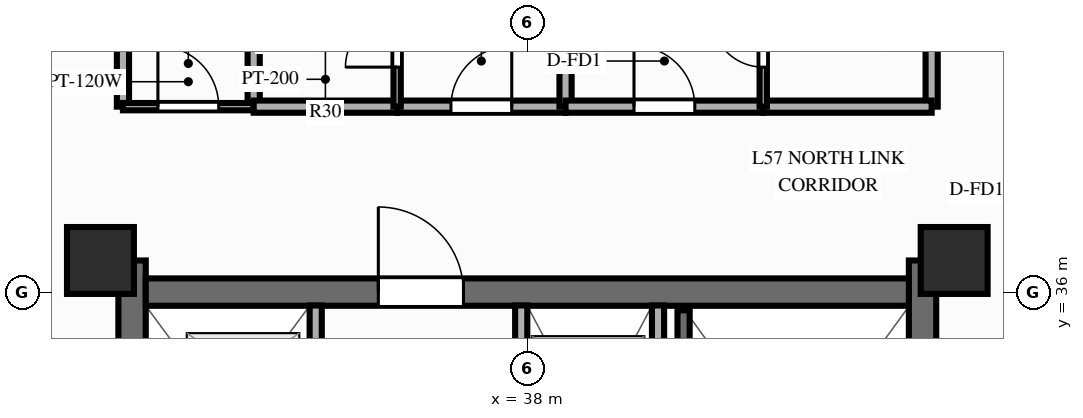
"""IFC4 building model, lengths in metres.
Left out: names, types, materials, properties, quantities, classifications, styles, units other than length and angle.
Written with IfcOpenShell. Run it as: python <this file> out.ifc"""

import sys

from ifc_helpers import new_model, si_unit, direction, frame, frame_2d, origin, origin_2d, place, context, subcontext, project, spatial, rectangle, extrude, source, transform, mapped, element, fill, save


model = new_model("IFC4")
c1 = context("Model", 3, precision=1e-05, world=origin(), true_north=direction((0.0, 1.0)))
c2 = subcontext(c1, "Body", "Model", "MODEL_VIEW")
j1 = project(units=[si_unit("LENGTHUNIT", "METRE"), si_unit("PLANEANGLEUNIT", "RADIAN")], contexts=[c1])
p1 = place(None, origin())
s1 = spatial("IfcSite", under=j1, at=p1, CompositionType="ELEMENT")
p2 = place(p1, origin())
s2 = spatial("IfcBuilding", under=s1, at=p2, CompositionType="ELEMENT")
p3 = place(p2, frame((0.0, 0.0, 182.8)))
s3 = spatial("IfcBuildingStorey", under=s2, at=p3, CompositionType="ELEMENT", Elevation=182.8)
p4 = place(p3, frame((31.5, 17.48, 0.0), z_axis=(0.0, 0.0, 1.0), x_axis=(0.0, 1.0, 0.0)))
e1 = element("IfcWall", 1, at=p4, inside=s3, PredefinedType="SHEAR", context=c2, shape_type="SweptSolid", body=[
    extrude(rectangle(XDim=19.04, YDim=0.45, at=frame_2d((9.52, 0.0))), origin(), (0.0, 0.0, 1.0), 3.9),
])
p5 = place(p4, frame((6.32, 0.0, 0.0)))
e2 = element("IfcOpeningElement", 2, at=p5, cuts=e1, PredefinedType="OPENING", context=c2, shape_type="SweptSolid", body=[
    extrude(rectangle(XDim=1.1, YDim=2.15, at=frame_2d((0.55, 1.075))), frame((0.0, 0.237, 0.0), z_axis=(0.0, -1.0, 0.0), x_axis=(1.0, 0.0, 0.0)), (0.0, 0.0, 1.0), 0.474),
])
p6 = place(p3, frame((44.5, 17.48, 0.0), z_axis=(0.0, 0.0, 1.0), x_axis=(0.0, 1.0, 0.0)))
e3 = element("IfcWall", 3, at=p6, inside=s3, PredefinedType="SHEAR", context=c2, shape_type="SweptSolid", body=[
    extrude(rectangle(XDim=19.04, YDim=0.45, at=frame_2d((9.52, 0.0))), origin(), (0.0, 0.0, 1.0), 3.9),
])
p7 = place(p6, frame((12.67, 0.0, 0.0), z_axis=(0.0, 0.0, 1.0), x_axis=(-1.0, 0.0, 0.0)))
e4 = element("IfcOpeningElement", 4, at=p7, cuts=e3, PredefinedType="OPENING", context=c2, shape_type="SweptSolid", body=[
    extrude(rectangle(XDim=1.1, YDim=2.15, at=frame_2d((0.55, 1.075))), frame((0.0, 0.237, 0.0), z_axis=(0.0, -1.0, 0.0), x_axis=(1.0, 0.0, 0.0)), (0.0, 0.0, 1.0), 0.474),
])
p8 = place(p3, frame((31.725, 36.0, 0.0), z_axis=(0.0, 0.0, 1.0), x_axis=(1.0, 0.0, 0.0)))
e5 = element("IfcWall", 5, at=p8, inside=s3, PredefinedType="SHEAR", context=c2, shape_type="SweptSolid", body=[
    extrude(rectangle(XDim=12.55, YDim=0.45, at=frame_2d((6.275, 0.0))), origin(), (0.0, 0.0, 1.0), 3.9),
])
p9 = place(p8, frame((5.225, 0.0, 0.0), z_axis=(0.0, 0.0, 1.0), x_axis=(-1.0, 0.0, 0.0)))
e6 = element("IfcOpeningElement", 6, at=p9, cuts=e5, PredefinedType="OPENING", context=c2, shape_type="SweptSolid", body=[
    extrude(rectangle(XDim=1.4, YDim=2.15, at=frame_2d((0.7, 1.075))), frame((0.0, 0.237, 0.0), z_axis=(0.0, -1.0, 0.0), x_axis=(1.0, 0.0, 0.0)), (0.0, 0.0, 1.0), 0.474),
])
m1 = source(origin(), c2, "Body", "SweptSolid", [
    extrude(rectangle(XDim=1.1, YDim=1.1, at=origin_2d()), origin(), (0.0, 0.0, 1.0), 3.9),
])
for number, where, z_axis, x_axis in (
    (7, (30.98, 36.52, 0.0), (0.0, 0.0, 1.0), (1.0, 0.0, 0.0)),
    (8, (45.02, 36.52, 0.0), (0.0, 0.0, 1.0), (1.0, 0.0, 0.0)),
):
    element("IfcColumn", number, at=place(p3, frame(where, z_axis=z_axis, x_axis=x_axis)), inside=s3, PredefinedType="COLUMN", context=c2, shape_type="MappedRepresentation", body=[
        mapped(m1, transform((0.0, 0.0, 0.0), scale=1.0)),
    ])
p10 = place(p3, frame((40.15, 31.8, 0.0), z_axis=(0.0, 0.0, 1.0), x_axis=(0.0, 1.0, 0.0)))
e9 = element("IfcWall", 9, at=p10, inside=s3, PredefinedType="PARTITIONING", context=c2, shape_type="SweptSolid", body=[
    extrude(rectangle(XDim=3.98, YDim=0.2, at=frame_2d((1.99, 0.0))), origin(), (0.0, 0.0, 1.0), 3.69),
])
p11 = place(p3, frame((40.57, 28.65, 0.0), z_axis=(0.0, 0.0, 1.0), x_axis=(0.0, 1.0, 0.0)))
e10 = element("IfcWall", 10, at=p11, inside=s3, PredefinedType="SOLIDWALL", context=c2, shape_type="SweptSolid", body=[
    extrude(rectangle(XDim=7.05, YDim=0.2, at=frame_2d((3.525, 0.0))), origin(), (0.0, 0.0, 1.0), 3.69),
])
p12 = place(p3, frame((34.52, 25.44, 0.0), z_axis=(0.0, 0.0, 1.0), x_axis=(0.0, 1.0, 0.0)))
e11 = element("IfcWall", 11, at=p12, inside=s3, PredefinedType="PARTITIONING", context=c2, shape_type="SweptSolid", body=[
    extrude(rectangle(XDim=10.34, YDim=0.2, at=frame_2d((5.17, 0.0))), origin(), (0.0, 0.0, 1.0), 3.69),
])
p13 = place(p12, frame((0.65, 0.0, 0.0)))
e12 = element("IfcOpeningElement", 12, at=p13, cuts=e11, PredefinedType="OPENING", context=c2, shape_type="SweptSolid", body=[
    extrude(rectangle(XDim=0.8, YDim=2.05, at=frame_2d((0.4, 1.025))), frame((0.0, 0.112, 0.0), z_axis=(0.0, -1.0, 0.0), x_axis=(1.0, 0.0, 0.0)), (0.0, 0.0, 1.0), 0.224),
])
p14 = place(p12, frame((2.75, 0.0, 0.0)))
e13 = element("IfcOpeningElement", 13, at=p14, cuts=e11, PredefinedType="OPENING", context=c2, shape_type="SweptSolid", body=[
    extrude(rectangle(XDim=0.8, YDim=2.05, at=frame_2d((0.4, 1.025))), frame((0.0, 0.112, 0.0), z_axis=(0.0, -1.0, 0.0), x_axis=(1.0, 0.0, 0.0)), (0.0, 0.0, 1.0), 0.224),
])
p15 = place(p12, frame((4.95, 0.0, 0.0)))
e14 = element("IfcOpeningElement", 14, at=p15, cuts=e11, PredefinedType="OPENING", context=c2, shape_type="SweptSolid", body=[
    extrude(rectangle(XDim=0.8, YDim=2.05, at=frame_2d((0.4, 1.025))), frame((0.0, 0.112, 0.0), z_axis=(0.0, -1.0, 0.0), x_axis=(1.0, 0.0, 0.0)), (0.0, 0.0, 1.0), 0.224),
])
p16 = place(p12, frame((7.01, 0.0, 0.0)))
e15 = element("IfcOpeningElement", 15, at=p16, cuts=e11, PredefinedType="OPENING", context=c2, shape_type="SweptSolid", body=[
    extrude(rectangle(XDim=1.0, YDim=2.15, at=frame_2d((0.5, 1.075))), frame((0.0, 0.112, 0.0), z_axis=(0.0, -1.0, 0.0), x_axis=(1.0, 0.0, 0.0)), (0.0, 0.0, 1.0), 0.224),
])
p17 = place(p12, frame((8.76, 0.0, 0.0)))
e16 = element("IfcOpeningElement", 16, at=p17, cuts=e11, PredefinedType="OPENING", context=c2, shape_type="SweptSolid", body=[
    extrude(rectangle(XDim=1.0, YDim=2.15, at=frame_2d((0.5, 1.075))), frame((0.0, 0.112, 0.0), z_axis=(0.0, -1.0, 0.0), x_axis=(1.0, 0.0, 0.0)), (0.0, 0.0, 1.0), 0.224),
])
p18 = place(p3, frame((37.9, 25.44, 0.0), z_axis=(0.0, 0.0, 1.0), x_axis=(0.0, 1.0, 0.0)))
e17 = element("IfcWall", 17, at=p18, inside=s3, PredefinedType="PARTITIONING", context=c2, shape_type="SweptSolid", body=[
    extrude(rectangle(XDim=10.34, YDim=0.2, at=frame_2d((5.17, 0.0))), origin(), (0.0, 0.0, 1.0), 3.69),
])
p19 = place(p18, frame((1.15, 0.0, 0.0)))
e18 = element("IfcOpeningElement", 18, at=p19, cuts=e17, PredefinedType="OPENING", context=c2, shape_type="SweptSolid", body=[
    extrude(rectangle(XDim=0.9, YDim=2.1, at=frame_2d((0.45, 1.05))), frame((0.0, 0.112, 0.0), z_axis=(0.0, -1.0, 0.0), x_axis=(1.0, 0.0, 0.0)), (0.0, 0.0, 1.0), 0.224),
])
p20 = place(p18, frame((4.2, 0.0, 0.0)))
e19 = element("IfcOpeningElement", 19, at=p20, cuts=e17, PredefinedType="OPENING", context=c2, shape_type="SweptSolid", body=[
    extrude(rectangle(XDim=0.9, YDim=2.1, at=frame_2d((0.45, 1.05))), frame((0.0, 0.112, 0.0), z_axis=(0.0, -1.0, 0.0), x_axis=(1.0, 0.0, 0.0)), (0.0, 0.0, 1.0), 0.224),
])
p21 = place(p18, frame((6.86, 0.0, 0.0)))
e20 = element("IfcOpeningElement", 20, at=p21, cuts=e17, PredefinedType="OPENING", context=c2, shape_type="SweptSolid", body=[
    extrude(rectangle(XDim=1.0, YDim=2.15, at=frame_2d((0.5, 1.075))), frame((0.0, 0.112, 0.0), z_axis=(0.0, -1.0, 0.0), x_axis=(1.0, 0.0, 0.0)), (0.0, 0.0, 1.0), 0.224),
])
p22 = place(p18, frame((8.71, 0.0, 0.0)))
e21 = element("IfcOpeningElement", 21, at=p22, cuts=e17, PredefinedType="OPENING", context=c2, shape_type="SweptSolid", body=[
    extrude(rectangle(XDim=1.0, YDim=2.15, at=frame_2d((0.5, 1.075))), frame((0.0, 0.112, 0.0), z_axis=(0.0, -1.0, 0.0), x_axis=(1.0, 0.0, 0.0)), (0.0, 0.0, 1.0), 0.224),
])
for number, where, z_axis, x_axis in (
    (22, (31.35, 39.05, 0.0), (0.0, 0.0, 1.0), (0.0, 1.0, 0.0)),
    (23, (44.65, 39.05, 0.0), (0.0, 0.0, 1.0), (0.0, 1.0, 0.0)),
):
    element("IfcWall", number, at=place(p3, frame(where, z_axis=z_axis, x_axis=x_axis)), inside=s3, PredefinedType="PARTITIONING", context=c2, shape_type="SweptSolid", body=[
        extrude(rectangle(XDim=8.8, YDim=0.2, at=frame_2d((4.4, 0.0))), origin(), (0.0, 0.0, 1.0), 2.79),
    ])
p23 = place(p3, frame((33.5, 39.05, 0.0), z_axis=(0.0, 0.0, 1.0), x_axis=(0.0, 1.0, 0.0)))
e24 = element("IfcWall", 24, at=p23, inside=s3, PredefinedType="PARTITIONING", context=c2, shape_type="SweptSolid", body=[
    extrude(rectangle(XDim=8.8, YDim=0.2, at=frame_2d((4.4, 0.0))), origin(), (0.0, 0.0, 1.0), 3.69),
])
p24 = place(p3, frame((31.35, 39.05, 0.0), z_axis=(0.0, 0.0, 1.0), x_axis=(1.0, 0.0, 0.0)))
e25 = element("IfcWall", 25, at=p24, inside=s3, PredefinedType="PARTITIONING", context=c2, shape_type="SweptSolid", body=[
    extrude(rectangle(XDim=2.15, YDim=0.12, at=frame_2d((1.075, 0.0))), origin(), (0.0, 0.0, 1.0), 3.69),
])
p25 = place(p24, frame((0.575, 0.0, 0.0)))
e26 = element("IfcOpeningElement", 26, at=p25, cuts=e25, PredefinedType="OPENING", context=c2, shape_type="SweptSolid", body=[
    extrude(rectangle(XDim=1.0, YDim=2.1, at=frame_2d((0.5, 1.05))), frame((0.0, 0.072, 0.0), z_axis=(0.0, -1.0, 0.0), x_axis=(1.0, 0.0, 0.0)), (0.0, 0.0, 1.0), 0.144),
])
p26 = place(p3, frame((33.5, 39.05, 0.0), z_axis=(0.0, 0.0, 1.0), x_axis=(1.0, 0.0, 0.0)))
e27 = element("IfcWall", 27, at=p26, inside=s3, PredefinedType="PARTITIONING", context=c2, shape_type="SweptSolid", body=[
    extrude(rectangle(XDim=2.359, YDim=0.2, at=frame_2d((1.18, 0.0))), origin(), (0.0, 0.0, 1.0), 3.69),
])
p27 = place(p3, frame((35.859, 39.05, 0.0), z_axis=(0.0, 0.0, 1.0), x_axis=(1.0, 0.0, 0.0)))
e28 = element("IfcWall", 28, at=p27, inside=s3, PredefinedType="PARTITIONING", context=c2, shape_type="SweptSolid", body=[
    extrude(rectangle(XDim=2.77, YDim=0.2, at=frame_2d((1.385, 0.0))), origin(), (0.0, 0.0, 1.0), 3.69),
])
p28 = place(p27, frame((0.885, 0.0, 0.0)))
e29 = element("IfcOpeningElement", 29, at=p28, cuts=e28, PredefinedType="OPENING", context=c2, shape_type="SweptSolid", body=[
    extrude(rectangle(XDim=1.0, YDim=2.15, at=frame_2d((0.5, 1.075))), frame((0.0, 0.112, 0.0), z_axis=(0.0, -1.0, 0.0), x_axis=(1.0, 0.0, 0.0)), (0.0, 0.0, 1.0), 0.224),
])
p29 = place(p3, frame((35.859, 39.05, 0.0), z_axis=(0.0, 0.0, 1.0), x_axis=(0.0, 1.0, 0.0)))
e30 = element("IfcWall", 30, at=p29, inside=s3, PredefinedType="PARTITIONING", context=c2, shape_type="SweptSolid", body=[
    extrude(rectangle(XDim=2.15, YDim=0.12, at=frame_2d((1.075, 0.0))), origin(), (0.0, 0.0, 1.0), 3.69),
])
p30 = place(p29, frame((0.65, 0.0, 0.0)))
e31 = element("IfcOpeningElement", 31, at=p30, cuts=e30, PredefinedType="OPENING", context=c2, shape_type="SweptSolid", body=[
    extrude(rectangle(XDim=0.85, YDim=2.05, at=frame_2d((0.425, 1.025))), frame((0.0, 0.072, 0.0), z_axis=(0.0, -1.0, 0.0), x_axis=(1.0, 0.0, 0.0)), (0.0, 0.0, 1.0), 0.144),
])
p31 = place(p3, frame((38.629, 39.05, 0.0), z_axis=(0.0, 0.0, 1.0), x_axis=(0.0, 1.0, 0.0)))
e32 = element("IfcWall", 32, at=p31, inside=s3, PredefinedType="PARTITIONING", context=c2, shape_type="SweptSolid", body=[
    extrude(rectangle(XDim=8.8, YDim=0.2, at=frame_2d((4.4, 0.0))), origin(), (0.0, 0.0, 1.0), 3.69),
])
p32 = place(p3, frame((38.629, 39.05, 0.0), z_axis=(0.0, 0.0, 1.0), x_axis=(1.0, 0.0, 0.0)))
e33 = element("IfcWall", 33, at=p32, inside=s3, PredefinedType="PARTITIONING", context=c2, shape_type="SweptSolid", body=[
    extrude(rectangle(XDim=3.251, YDim=0.2, at=frame_2d((1.626, 0.0))), origin(), (0.0, 0.0, 1.0), 3.69),
])
p33 = place(p32, frame((1.126, 0.0, 0.0)))
e34 = element("IfcOpeningElement", 34, at=p33, cuts=e33, PredefinedType="OPENING", context=c2, shape_type="SweptSolid", body=[
    extrude(rectangle(XDim=1.0, YDim=2.15, at=frame_2d((0.5, 1.075))), frame((0.0, 0.112, 0.0), z_axis=(0.0, -1.0, 0.0), x_axis=(1.0, 0.0, 0.0)), (0.0, 0.0, 1.0), 0.224),
])
p34 = place(p3, frame((41.88, 39.05, 0.0), z_axis=(0.0, 0.0, 1.0), x_axis=(1.0, 0.0, 0.0)))
e35 = element("IfcWall", 35, at=p34, inside=s3, PredefinedType="PARTITIONING", context=c2, shape_type="SweptSolid", body=[
    extrude(rectangle(XDim=2.77, YDim=0.2, at=frame_2d((1.385, 0.0))), origin(), (0.0, 0.0, 1.0), 3.69),
])
p35 = place(p3, frame((41.88, 39.05, 0.0), z_axis=(0.0, 0.0, 1.0), x_axis=(0.0, 1.0, 0.0)))
e36 = element("IfcWall", 36, at=p35, inside=s3, PredefinedType="PARTITIONING", context=c2, shape_type="SweptSolid", body=[
    extrude(rectangle(XDim=2.15, YDim=0.12, at=frame_2d((1.075, 0.0))), origin(), (0.0, 0.0, 1.0), 3.69),
])
p36 = place(p35, frame((0.65, 0.0, 0.0)))
e37 = element("IfcOpeningElement", 37, at=p36, cuts=e36, PredefinedType="OPENING", context=c2, shape_type="SweptSolid", body=[
    extrude(rectangle(XDim=0.85, YDim=2.05, at=frame_2d((0.425, 1.025))), frame((0.0, 0.072, 0.0), z_axis=(0.0, -1.0, 0.0), x_axis=(1.0, 0.0, 0.0)), (0.0, 0.0, 1.0), 0.144),
])
m2 = source(origin(), c2, "Body", "SweptSolid", [
    extrude(rectangle(XDim=1.4, YDim=2.15, at=frame_2d((0.7, 1.075))), frame((0.0, 0.025, 0.0), z_axis=(0.0, -1.0, 0.0), x_axis=(1.0, 0.0, 0.0)), (0.0, 0.0, 1.0), 0.05),
])
p37 = place(p9, origin())
e38 = element("IfcDoor", 38, at=p37, inside=s3, OperationType="SINGLE_SWING_RIGHT", PredefinedType="DOOR", context=c2, shape_type="MappedRepresentation", body=[
    mapped(m2, transform((0.0, 0.0, 0.0), scale=1.0)),
])
fill(e6, e38)
m3 = source(origin(), c2, "Body", "SweptSolid", [
    extrude(rectangle(XDim=1.0, YDim=2.1, at=frame_2d((0.5, 1.05))), frame((0.0, 0.025, 0.0), z_axis=(0.0, -1.0, 0.0), x_axis=(1.0, 0.0, 0.0)), (0.0, 0.0, 1.0), 0.05),
])
p38 = place(p25, origin())
e39 = element("IfcDoor", 39, at=p38, inside=s3, OperationType="SINGLE_SWING_LEFT", PredefinedType="DOOR", context=c2, shape_type="MappedRepresentation", body=[
    mapped(m3, transform((0.0, 0.0, 0.0), scale=1.0)),
])
fill(e26, e39)
m4 = source(origin(), c2, "Body", "SweptSolid", [
    extrude(rectangle(XDim=1.0, YDim=2.15, at=frame_2d((0.5, 1.075))), frame((0.0, 0.025, 0.0), z_axis=(0.0, -1.0, 0.0), x_axis=(1.0, 0.0, 0.0)), (0.0, 0.0, 1.0), 0.05),
])
p39 = place(p28, origin())
e40 = element("IfcDoor", 40, at=p39, inside=s3, OperationType="SINGLE_SWING_RIGHT", PredefinedType="DOOR", context=c2, shape_type="MappedRepresentation", body=[
    mapped(m4, transform((0.0, 0.0, 0.0), scale=1.0)),
])
fill(e29, e40)
m5 = source(origin(), c2, "Body", "SweptSolid", [
    extrude(rectangle(XDim=0.85, YDim=2.05, at=frame_2d((0.425, 1.025))), frame((0.0, 0.025, 0.0), z_axis=(0.0, -1.0, 0.0), x_axis=(1.0, 0.0, 0.0)), (0.0, 0.0, 1.0), 0.05),
])
p40 = place(p30, origin())
e41 = element("IfcDoor", 41, at=p40, inside=s3, OperationType="SINGLE_SWING_LEFT", PredefinedType="DOOR", context=c2, shape_type="MappedRepresentation", body=[
    mapped(m5, transform((0.0, 0.0, 0.0), scale=1.0)),
])
fill(e31, e41)
p41 = place(p33, origin())
e42 = element("IfcDoor", 42, at=p41, inside=s3, OperationType="SINGLE_SWING_LEFT", PredefinedType="DOOR", context=c2, shape_type="MappedRepresentation", body=[
    mapped(m4, transform((0.0, 0.0, 0.0), scale=1.0)),
])
fill(e34, e42)
p42 = place(p36, origin())
e43 = element("IfcDoor", 43, at=p42, inside=s3, OperationType="SINGLE_SWING_RIGHT", PredefinedType="DOOR", context=c2, shape_type="MappedRepresentation", body=[
    mapped(m5, transform((0.0, 0.0, 0.0), scale=1.0)),
])
fill(e37, e43)
save(model, sys.argv[1])
